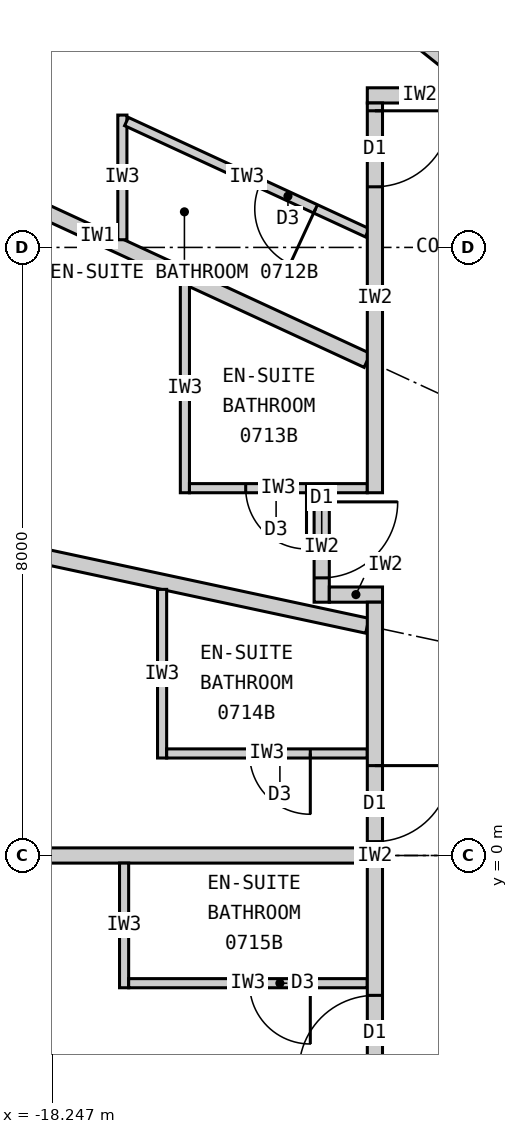
"""IFC4 building model, lengths in metres.
Left out: names, types, materials, properties, quantities, classifications, styles, units other than length and angle.
Written with IfcOpenShell. Run it as: python <this file> out.ifc"""

import sys

from ifc_helpers import new_model, si_unit, direction, frame, frame_2d, origin, place, context, subcontext, project, spatial, rectangle, extrude, element, fill, save


model = new_model("IFC4")
c1 = context("Model", 3, precision=1e-05, world=origin(), true_north=direction((0.0, 1.0)))
c2 = subcontext(c1, "Body", "Model", "MODEL_VIEW")
j1 = project(units=[si_unit("LENGTHUNIT", "METRE"), si_unit("PLANEANGLEUNIT", "RADIAN")], contexts=[c1])
p1 = place(None, origin())
s1 = spatial("IfcSite", under=j1, at=p1, CompositionType="ELEMENT")
p2 = place(p1, origin())
s2 = spatial("IfcBuilding", under=s1, at=p2, CompositionType="ELEMENT")
p3 = place(p2, frame((0.0, 0.0, 36.0)))
s3 = spatial("IfcBuildingStorey", under=s2, at=p3, CompositionType="ELEMENT", Elevation=36.0)
p4 = place(p3, frame((-12.625, 10.1, 0.0), z_axis=(0.0, 0.0, 1.0), x_axis=(-0.780872884676, 0.624689953479, 0.0)))
e1 = element("IfcWall", 1, at=p4, inside=s3, PredefinedType="PARTITIONING", context=c2, shape_type="SweptSolid", body=[
    extrude(rectangle(XDim=5.845, YDim=0.2, at=frame_2d((2.922, 0.0))), origin(), (0.0, 0.0, 1.0), 2.32),
])
p5 = place(p3, frame((-14.1, 6.512, 0.0), z_axis=(0.0, 0.0, 1.0), x_axis=(-0.907842433118, 0.41931147925, 0.0)))
e2 = element("IfcWall", 2, at=p5, inside=s3, PredefinedType="PARTITIONING", context=c2, shape_type="SweptSolid", body=[
    extrude(rectangle(XDim=7.823, YDim=0.2, at=frame_2d((3.912, 0.0))), origin(), (0.0, 0.0, 1.0), 2.32),
])
p6 = place(p3, frame((-14.1, 3.022, 0.0), z_axis=(0.0, 0.0, 1.0), x_axis=(-0.977786510688, 0.209603290805, 0.0)))
e3 = element("IfcWall", 3, at=p6, inside=s3, PredefinedType="PARTITIONING", context=c2, shape_type="SweptSolid", body=[
    extrude(rectangle(XDim=9.887, YDim=0.2, at=frame_2d((4.943, 0.0))), origin(), (0.0, 0.0, 1.0), 2.32),
])
p7 = place(p3, frame((-14.1, 0.0, 0.0), z_axis=(0.0, 0.0, 1.0), x_axis=(-1.0, 0.0, 0.0)))
e4 = element("IfcWall", 4, at=p7, inside=s3, PredefinedType="PARTITIONING", context=c2, shape_type="SweptSolid", body=[
    extrude(rectangle(XDim=10.55, YDim=0.2, at=frame_2d((5.275, 0.0))), origin(), (0.0, 0.0, 1.0), 2.27),
])
p8 = place(p3, frame((-17.323, 8.101, 0.0), z_axis=(0.0, 0.0, 1.0), x_axis=(0.0, 1.0, 0.0)))
e5 = element("IfcWall", 5, at=p8, inside=s3, PredefinedType="PARTITIONING", context=c2, shape_type="SweptSolid", body=[
    extrude(rectangle(XDim=1.64, YDim=0.12, at=frame_2d((0.82, 0.0))), origin(), (0.0, 0.0, 1.0), 3.12),
])
p9 = place(p3, frame((-14.1, 8.193, 0.0), z_axis=(0.0, 0.0, 1.0), x_axis=(-0.907836493557, 0.419324338628, 0.0)))
e6 = element("IfcWall", 6, at=p9, inside=s3, PredefinedType="PARTITIONING", context=c2, shape_type="SweptSolid", body=[
    extrude(rectangle(XDim=3.49, YDim=0.12, at=frame_2d((1.745, 0.0))), origin(), (0.0, 0.0, 1.0), 3.12),
])
p10 = place(p9, frame((0.75, 0.0, 0.0)))
e7 = element("IfcOpeningElement", 7, at=p10, cuts=e6, PredefinedType="OPENING", context=c2, shape_type="SweptSolid", body=[
    extrude(rectangle(XDim=0.8, YDim=2.1, at=frame_2d((0.4, 1.05))), frame((0.0, 0.07, 0.0), z_axis=(0.0, -1.0, 0.0), x_axis=(1.0, 0.0, 0.0)), (0.0, 0.0, 1.0), 0.14),
])
p11 = place(p3, frame((-16.5, 7.521, 0.0), z_axis=(0.0, 0.0, 1.0), x_axis=(0.0, -1.0, 0.0)))
e8 = element("IfcWall", 8, at=p11, inside=s3, PredefinedType="PARTITIONING", context=c2, shape_type="SweptSolid", body=[
    extrude(rectangle(XDim=2.749, YDim=0.12, at=frame_2d((1.374, 0.0))), origin(), (0.0, 0.0, 1.0), 3.12),
])
p12 = place(p3, frame((-14.1, 4.833, 0.0), z_axis=(0.0, 0.0, 1.0), x_axis=(-1.0, 0.0, 0.0)))
e9 = element("IfcWall", 9, at=p12, inside=s3, PredefinedType="PARTITIONING", context=c2, shape_type="SweptSolid", body=[
    extrude(rectangle(XDim=2.34, YDim=0.12, at=frame_2d((1.17, 0.0))), origin(), (0.0, 0.0, 1.0), 3.12),
])
p13 = place(p12, frame((0.8, 0.0, 0.0)))
e10 = element("IfcOpeningElement", 10, at=p13, cuts=e9, PredefinedType="OPENING", context=c2, shape_type="SweptSolid", body=[
    extrude(rectangle(XDim=0.8, YDim=2.1, at=frame_2d((0.4, 1.05))), frame((0.0, 0.07, 0.0), z_axis=(0.0, -1.0, 0.0), x_axis=(1.0, 0.0, 0.0)), (0.0, 0.0, 1.0), 0.14),
])
p14 = place(p3, frame((-16.8, 3.501, 0.0), z_axis=(0.0, 0.0, 1.0), x_axis=(0.0, -1.0, 0.0)))
e11 = element("IfcWall", 11, at=p14, inside=s3, PredefinedType="PARTITIONING", context=c2, shape_type="SweptSolid", body=[
    extrude(rectangle(XDim=2.219, YDim=0.12, at=frame_2d((1.109, 0.0))), origin(), (0.0, 0.0, 1.0), 3.12),
])
p15 = place(p3, frame((-14.1, 1.343, 0.0), z_axis=(0.0, 0.0, 1.0), x_axis=(-1.0, 0.0, 0.0)))
e12 = element("IfcWall", 12, at=p15, inside=s3, PredefinedType="PARTITIONING", context=c2, shape_type="SweptSolid", body=[
    extrude(rectangle(XDim=2.64, YDim=0.12, at=frame_2d((1.32, 0.0))), origin(), (0.0, 0.0, 1.0), 3.12),
])
p16 = place(p15, frame((0.75, 0.0, 0.0)))
e13 = element("IfcOpeningElement", 13, at=p16, cuts=e12, PredefinedType="OPENING", context=c2, shape_type="SweptSolid", body=[
    extrude(rectangle(XDim=0.8, YDim=2.1, at=frame_2d((0.4, 1.05))), frame((0.0, 0.07, 0.0), z_axis=(0.0, -1.0, 0.0), x_axis=(1.0, 0.0, 0.0)), (0.0, 0.0, 1.0), 0.14),
])
p17 = place(p3, frame((-17.3, -0.1, 0.0), z_axis=(0.0, 0.0, 1.0), x_axis=(0.0, -1.0, 0.0)))
e14 = element("IfcWall", 14, at=p17, inside=s3, PredefinedType="PARTITIONING", context=c2, shape_type="SweptSolid", body=[
    extrude(rectangle(XDim=1.64, YDim=0.12, at=frame_2d((0.82, 0.0))), origin(), (0.0, 0.0, 1.0), 3.12),
])
p18 = place(p3, frame((-14.1, -1.68, 0.0), z_axis=(0.0, 0.0, 1.0), x_axis=(-1.0, 0.0, 0.0)))
e15 = element("IfcWall", 15, at=p18, inside=s3, PredefinedType="PARTITIONING", context=c2, shape_type="SweptSolid", body=[
    extrude(rectangle(XDim=3.14, YDim=0.12, at=frame_2d((1.57, 0.0))), origin(), (0.0, 0.0, 1.0), 3.12),
])
p19 = place(p18, frame((0.75, 0.0, 0.0)))
e16 = element("IfcOpeningElement", 16, at=p19, cuts=e15, PredefinedType="OPENING", context=c2, shape_type="SweptSolid", body=[
    extrude(rectangle(XDim=0.8, YDim=2.1, at=frame_2d((0.4, 1.05))), frame((0.0, 0.07, 0.0), z_axis=(0.0, -1.0, 0.0), x_axis=(1.0, 0.0, 0.0)), (0.0, 0.0, 1.0), 0.14),
])
p20 = place(p3, frame((-14.7, 4.772, 0.0), z_axis=(0.0, 0.0, 1.0), x_axis=(0.0, -1.0, 0.0)))
e17 = element("IfcWall", 17, at=p20, inside=s3, PredefinedType="PARTITIONING", context=c2, shape_type="SweptSolid", body=[
    extrude(rectangle(XDim=1.44, YDim=0.2, at=frame_2d((0.72, 0.0))), origin(), (0.0, 0.0, 1.0), 3.12),
])
p21 = place(p20, frame((0.12, 0.0, 0.0)))
e18 = element("IfcOpeningElement", 18, at=p21, cuts=e17, PredefinedType="OPENING", context=c2, shape_type="SweptSolid", body=[
    extrude(rectangle(XDim=1.0, YDim=2.2, at=frame_2d((0.5, 1.1))), frame((0.0, 0.11, 0.0), z_axis=(0.0, -1.0, 0.0), x_axis=(1.0, 0.0, 0.0)), (0.0, 0.0, 1.0), 0.22),
])
p22 = place(p3, frame((-13.9, 3.433, 0.0), z_axis=(0.0, 0.0, 1.0), x_axis=(-1.0, 0.0, 0.0)))
e19 = element("IfcWall", 19, at=p22, inside=s3, PredefinedType="PARTITIONING", context=c2, shape_type="SweptSolid", body=[
    extrude(rectangle(XDim=0.7, YDim=0.2, at=frame_2d((0.35, 0.0))), origin(), (0.0, 0.0, 1.0), 2.32),
])
p23 = place(p3, frame((-14.1, 10.0, 0.0), z_axis=(0.0, 0.0, 1.0), x_axis=(1.0, 0.0, 0.0)))
e20 = element("IfcWall", 20, at=p23, inside=s3, PredefinedType="PARTITIONING", context=c2, shape_type="SweptSolid", body=[
    extrude(rectangle(XDim=2.481, YDim=0.2, at=frame_2d((1.24, 0.0))), origin(), (0.0, 0.0, 1.0), 3.12),
])
p24 = place(p3, frame((-14.0, 9.9, 0.0), z_axis=(0.0, 0.0, 1.0), x_axis=(0.0, -1.0, 0.0)))
e21 = element("IfcWall", 21, at=p24, inside=s3, PredefinedType="PARTITIONING", context=c2, shape_type="SweptSolid", body=[
    extrude(rectangle(XDim=5.127, YDim=0.2, at=frame_2d((2.564, 0.0))), origin(), (0.0, 0.0, 1.0), 3.12),
])
p25 = place(p24, frame((0.103, 0.0, 0.0)))
e22 = element("IfcOpeningElement", 22, at=p25, cuts=e21, PredefinedType="OPENING", context=c2, shape_type="SweptSolid", body=[
    extrude(rectangle(XDim=1.0, YDim=2.2, at=frame_2d((0.5, 1.1))), frame((0.0, 0.11, 0.0), z_axis=(0.0, -1.0, 0.0), x_axis=(1.0, 0.0, 0.0)), (0.0, 0.0, 1.0), 0.22),
])
p26 = place(p3, frame((-14.0, 3.333, 0.0), z_axis=(0.0, 0.0, 1.0), x_axis=(0.0, -1.0, 0.0)))
e23 = element("IfcWall", 23, at=p26, inside=s3, PredefinedType="PARTITIONING", context=c2, shape_type="SweptSolid", body=[
    extrude(rectangle(XDim=6.665, YDim=0.2, at=frame_2d((3.333, 0.0))), origin(), (0.0, 0.0, 1.0), 3.12),
])
p27 = place(p26, frame((2.15, 0.0, 0.0)))
e24 = element("IfcOpeningElement", 24, at=p27, cuts=e23, PredefinedType="OPENING", context=c2, shape_type="SweptSolid", body=[
    extrude(rectangle(XDim=1.0, YDim=2.2, at=frame_2d((0.5, 1.1))), frame((0.0, 0.11, 0.0), z_axis=(0.0, -1.0, 0.0), x_axis=(1.0, 0.0, 0.0)), (0.0, 0.0, 1.0), 0.22),
])
p28 = place(p26, frame((5.173, 0.0, 0.0)))
e25 = element("IfcOpeningElement", 25, at=p28, cuts=e23, PredefinedType="OPENING", context=c2, shape_type="SweptSolid", body=[
    extrude(rectangle(XDim=1.0, YDim=2.2, at=frame_2d((0.5, 1.1))), frame((0.0, 0.11, 0.0), z_axis=(0.0, -1.0, 0.0), x_axis=(1.0, 0.0, 0.0)), (0.0, 0.0, 1.0), 0.22),
])
p29 = place(p10, origin())
e26 = element("IfcDoor", 26, at=p29, inside=s3, OperationType="SINGLE_SWING_LEFT", PredefinedType="DOOR", context=c2, shape_type="SweptSolid", body=[
    extrude(rectangle(XDim=0.8, YDim=2.1, at=frame_2d((0.4, 1.05))), frame((0.0, 0.025, 0.0), z_axis=(0.0, -1.0, 0.0), x_axis=(1.0, 0.0, 0.0)), (0.0, 0.0, 1.0), 0.05),
])
fill(e7, e26)
p30 = place(p25, origin())
e27 = element("IfcDoor", 27, at=p30, inside=s3, OperationType="SINGLE_SWING_LEFT", PredefinedType="DOOR", context=c2, shape_type="SweptSolid", body=[
    extrude(rectangle(XDim=1.0, YDim=2.2, at=frame_2d((0.5, 1.1))), frame((0.0, 0.025, 0.0), z_axis=(0.0, -1.0, 0.0), x_axis=(1.0, 0.0, 0.0)), (0.0, 0.0, 1.0), 0.05),
])
fill(e22, e27)
p31 = place(p13, origin())
e28 = element("IfcDoor", 28, at=p31, inside=s3, OperationType="SINGLE_SWING_LEFT", PredefinedType="DOOR", context=c2, shape_type="SweptSolid", body=[
    extrude(rectangle(XDim=0.8, YDim=2.1, at=frame_2d((0.4, 1.05))), frame((0.0, 0.025, 0.0), z_axis=(0.0, -1.0, 0.0), x_axis=(1.0, 0.0, 0.0)), (0.0, 0.0, 1.0), 0.05),
])
fill(e10, e28)
p32 = place(p21, origin())
e29 = element("IfcDoor", 29, at=p32, inside=s3, OperationType="SINGLE_SWING_LEFT", PredefinedType="DOOR", context=c2, shape_type="SweptSolid", body=[
    extrude(rectangle(XDim=1.0, YDim=2.2, at=frame_2d((0.5, 1.1))), frame((0.0, 0.025, 0.0), z_axis=(0.0, -1.0, 0.0), x_axis=(1.0, 0.0, 0.0)), (0.0, 0.0, 1.0), 0.05),
])
fill(e18, e29)
p33 = place(p16, origin())
e30 = element("IfcDoor", 30, at=p33, inside=s3, OperationType="SINGLE_SWING_LEFT", PredefinedType="DOOR", context=c2, shape_type="SweptSolid", body=[
    extrude(rectangle(XDim=0.8, YDim=2.1, at=frame_2d((0.4, 1.05))), frame((0.0, 0.025, 0.0), z_axis=(0.0, -1.0, 0.0), x_axis=(1.0, 0.0, 0.0)), (0.0, 0.0, 1.0), 0.05),
])
fill(e13, e30)
p34 = place(p27, origin())
e31 = element("IfcDoor", 31, at=p34, inside=s3, OperationType="SINGLE_SWING_LEFT", PredefinedType="DOOR", context=c2, shape_type="SweptSolid", body=[
    extrude(rectangle(XDim=1.0, YDim=2.2, at=frame_2d((0.5, 1.1))), frame((0.0, 0.025, 0.0), z_axis=(0.0, -1.0, 0.0), x_axis=(1.0, 0.0, 0.0)), (0.0, 0.0, 1.0), 0.05),
])
fill(e24, e31)
p35 = place(p19, origin())
e32 = element("IfcDoor", 32, at=p35, inside=s3, OperationType="SINGLE_SWING_LEFT", PredefinedType="DOOR", context=c2, shape_type="SweptSolid", body=[
    extrude(rectangle(XDim=0.8, YDim=2.1, at=frame_2d((0.4, 1.05))), frame((0.0, 0.025, 0.0), z_axis=(0.0, -1.0, 0.0), x_axis=(1.0, 0.0, 0.0)), (0.0, 0.0, 1.0), 0.05),
])
fill(e16, e32)
p36 = place(p28, origin())
e33 = element("IfcDoor", 33, at=p36, inside=s3, OperationType="SINGLE_SWING_RIGHT", PredefinedType="DOOR", context=c2, shape_type="SweptSolid", body=[
    extrude(rectangle(XDim=1.0, YDim=2.2, at=frame_2d((0.5, 1.1))), frame((0.0, 0.025, 0.0), z_axis=(0.0, -1.0, 0.0), x_axis=(1.0, 0.0, 0.0)), (0.0, 0.0, 1.0), 0.05),
])
fill(e25, e33)
save(model, sys.argv[1])
